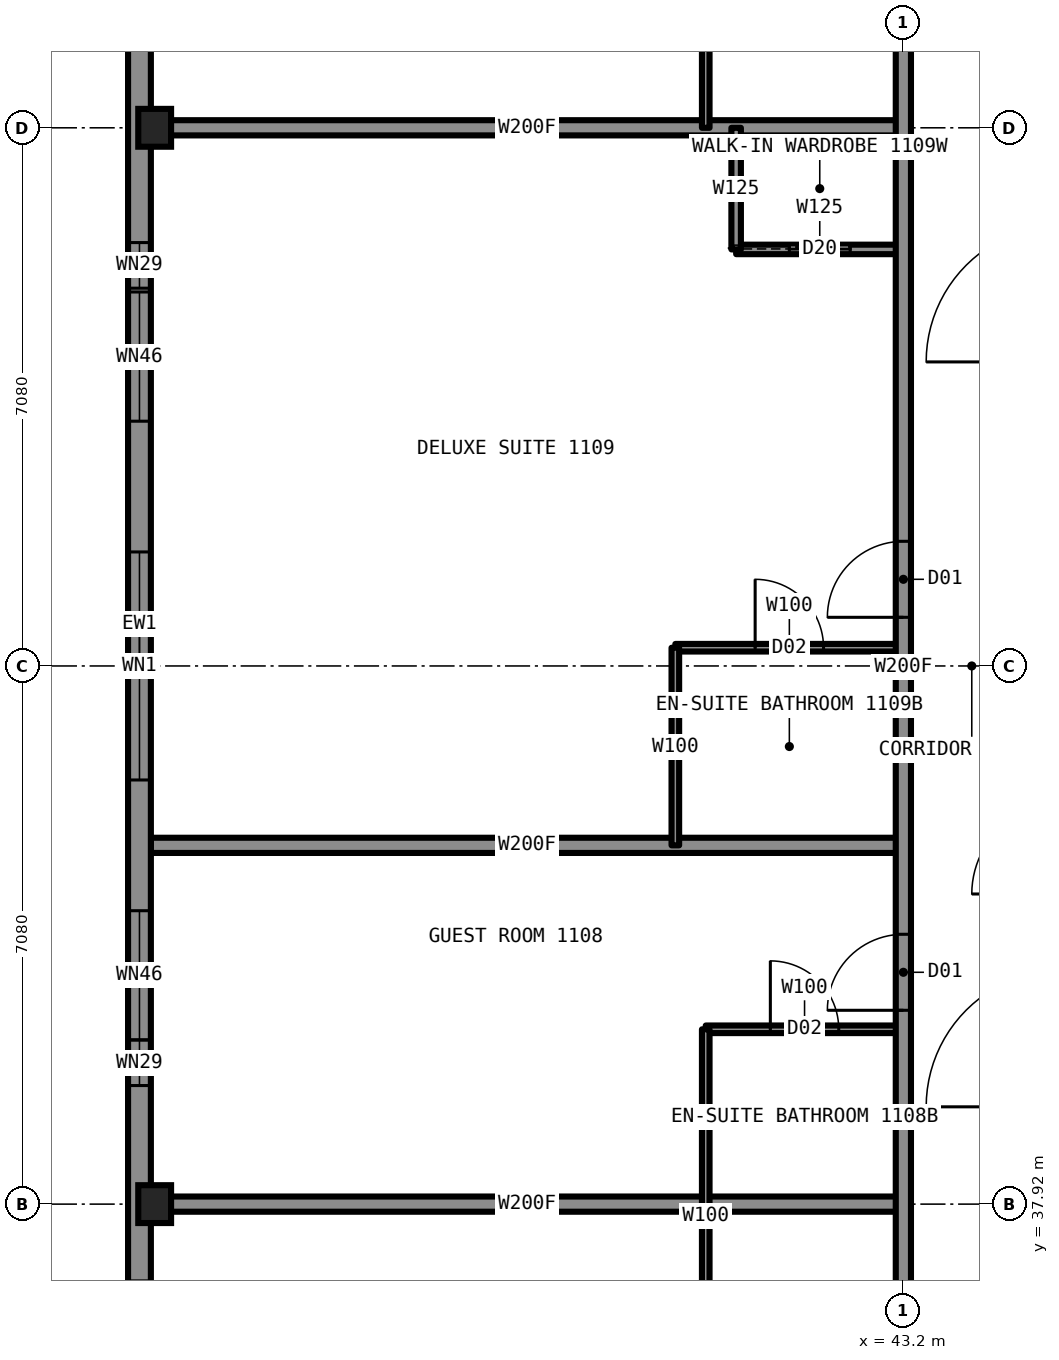
"""IFC4 building model, lengths in metres.
Left out: names, types, materials, properties, quantities, classifications, styles, units other than length and angle.
Written with IfcOpenShell. Run it as: python <this file> out.ifc"""

import sys

from ifc_helpers import new_model, si_unit, direction, frame, frame_2d, origin, origin_2d, place, context, subcontext, project, spatial, rectangle, i_section, extrude, element, fill, save


model = new_model("IFC4")
c1 = context("Model", 3, precision=1e-05, world=origin(), true_north=direction((0.0, 1.0)))
c2 = subcontext(c1, "Body", "Model", "MODEL_VIEW")
j1 = project(units=[si_unit("LENGTHUNIT", "METRE"), si_unit("PLANEANGLEUNIT", "RADIAN")], contexts=[c1])
p1 = place(None, origin())
s1 = spatial("IfcSite", under=j1, at=p1, CompositionType="ELEMENT")
p2 = place(p1, origin())
s2 = spatial("IfcBuilding", under=s1, at=p2, CompositionType="ELEMENT")
p3 = place(p2, frame((0.0, 0.0, 39.0)))
s3 = spatial("IfcBuildingStorey", under=s2, at=p3, CompositionType="ELEMENT", Elevation=39.0)
for number, where, z_axis, x_axis in (
    (1, (33.35, 37.92, 0.0), (0.0, 0.0, 1.0), (1.0, 0.0, 0.0)),
    (2, (33.35, 52.08, 0.0), (0.0, 0.0, 1.0), (1.0, 0.0, 0.0)),
):
    element("IfcColumn", number, at=place(p3, frame(where, z_axis=z_axis, x_axis=x_axis)), inside=s3, PredefinedType="COLUMN", context=c2, shape_type="SweptSolid", body=[
        extrude(i_section(OverallWidth=0.432, OverallDepth=0.498, WebThickness=0.056, FlangeThickness=0.089, at=origin_2d()), origin(), (0.0, 0.0, 1.0), 3.5),
    ])
p4 = place(p3, frame((33.3, 42.64, 0.0), z_axis=(0.0, 0.0, 1.0), x_axis=(1.0, 0.0, 0.0)))
e3 = element("IfcWall", 3, at=p4, inside=s3, PredefinedType="PARTITIONING", context=c2, shape_type="SweptSolid", body=[
    extrude(rectangle(XDim=9.9, YDim=0.2, at=frame_2d((4.95, 0.0))), origin(), (0.0, 0.0, 1.0), 2.723),
])
p5 = place(p3, frame((40.6, 40.22, 0.0), z_axis=(0.0, 0.0, 1.0), x_axis=(1.0, 0.0, 0.0)))
e4 = element("IfcWall", 4, at=p5, inside=s3, PredefinedType="PARTITIONING", context=c2, shape_type="SweptSolid", body=[
    extrude(rectangle(XDim=2.6, YDim=0.1, at=frame_2d((1.3, 0.0))), origin(), (0.0, 0.0, 1.0), 2.723),
])
p6 = place(p5, frame((0.85, 0.0, 0.0)))
e5 = element("IfcOpeningElement", 5, at=p6, cuts=e4, PredefinedType="OPENING", context=c2, shape_type="SweptSolid", body=[
    extrude(rectangle(XDim=0.9, YDim=2.1, at=frame_2d((0.45, 1.05))), frame((0.0, 0.06, 0.0), z_axis=(0.0, -1.0, 0.0), x_axis=(1.0, 0.0, 0.0)), (0.0, 0.0, 1.0), 0.12),
])
p7 = place(p3, frame((33.3, 37.92, 0.0), z_axis=(0.0, 0.0, 1.0), x_axis=(1.0, 0.0, 0.0)))
e6 = element("IfcWall", 6, at=p7, inside=s3, PredefinedType="PARTITIONING", context=c2, shape_type="SweptSolid", body=[
    extrude(rectangle(XDim=9.9, YDim=0.2, at=frame_2d((4.95, 0.0))), origin(), (0.0, 0.0, 1.0), 2.573),
])
p8 = place(p3, frame((40.2, 45.24, 0.0), z_axis=(0.0, 0.0, 1.0), x_axis=(1.0, 0.0, 0.0)))
e7 = element("IfcWall", 7, at=p8, inside=s3, PredefinedType="PARTITIONING", context=c2, shape_type="SweptSolid", body=[
    extrude(rectangle(XDim=3.0, YDim=0.1, at=frame_2d((1.5, 0.0))), origin(), (0.0, 0.0, 1.0), 3.33),
])
p9 = place(p8, frame((1.05, 0.0, 0.0)))
e8 = element("IfcOpeningElement", 8, at=p9, cuts=e7, PredefinedType="OPENING", context=c2, shape_type="SweptSolid", body=[
    extrude(rectangle(XDim=0.9, YDim=2.1, at=frame_2d((0.45, 1.05))), frame((0.0, 0.06, 0.0), z_axis=(0.0, -1.0, 0.0), x_axis=(1.0, 0.0, 0.0)), (0.0, 0.0, 1.0), 0.12),
])
p10 = place(p3, frame((41.0, 50.48, 0.0), z_axis=(0.0, 0.0, 1.0), x_axis=(1.0, 0.0, 0.0)))
e9 = element("IfcWall", 9, at=p10, inside=s3, PredefinedType="PARTITIONING", context=c2, shape_type="SweptSolid", body=[
    extrude(rectangle(XDim=2.2, YDim=0.125, at=frame_2d((1.1, 0.0))), origin(), (0.0, 0.0, 1.0), 3.33),
])
p11 = place(p10, frame((0.7, 0.0, 0.0)))
e10 = element("IfcOpeningElement", 10, at=p11, cuts=e9, PredefinedType="OPENING", context=c2, shape_type="SweptSolid", body=[
    extrude(rectangle(XDim=0.8, YDim=2.1, at=frame_2d((0.4, 1.05))), frame((0.0, 0.073, 0.0), z_axis=(0.0, -1.0, 0.0), x_axis=(1.0, 0.0, 0.0)), (0.0, 0.0, 1.0), 0.145),
])
p12 = place(p3, frame((33.3, 52.08, 0.0), z_axis=(0.0, 0.0, 1.0), x_axis=(1.0, 0.0, 0.0)))
e11 = element("IfcWall", 11, at=p12, inside=s3, PredefinedType="PARTITIONING", context=c2, shape_type="SweptSolid", body=[
    extrude(rectangle(XDim=9.9, YDim=0.2, at=frame_2d((4.95, 0.0))), origin(), (0.0, 0.0, 1.0), 2.573),
])
p13 = place(p3, frame((43.2, 33.2, 0.0), z_axis=(0.0, 0.0, 1.0), x_axis=(0.0, 1.0, 0.0)))
e12 = element("IfcWall", 12, at=p13, inside=s3, PredefinedType="PARTITIONING", context=c2, shape_type="SweptSolid", body=[
    extrude(rectangle(XDim=23.58, YDim=0.2, at=frame_2d((11.79, 0.0))), origin(), (0.0, 0.0, 1.0), 3.33),
])
p14 = place(p13, frame((7.27, 0.0, 0.0)))
e13 = element("IfcOpeningElement", 13, at=p14, cuts=e12, PredefinedType="OPENING", context=c2, shape_type="SweptSolid", body=[
    extrude(rectangle(XDim=1.0, YDim=2.2, at=frame_2d((0.5, 1.1))), frame((0.0, 0.11, 0.0), z_axis=(0.0, -1.0, 0.0), x_axis=(1.0, 0.0, 0.0)), (0.0, 0.0, 1.0), 0.22),
])
p15 = place(p13, frame((12.44, 0.0, 0.0)))
e14 = element("IfcOpeningElement", 14, at=p15, cuts=e12, PredefinedType="OPENING", context=c2, shape_type="SweptSolid", body=[
    extrude(rectangle(XDim=1.0, YDim=2.2, at=frame_2d((0.5, 1.1))), frame((0.0, 0.11, 0.0), z_axis=(0.0, -1.0, 0.0), x_axis=(1.0, 0.0, 0.0)), (0.0, 0.0, 1.0), 0.22),
])
p16 = place(p13, frame((21.84, 0.0, 0.0)))
e15 = element("IfcOpeningElement", 15, at=p16, cuts=e12, PredefinedType="OPENING", context=c2, shape_type="SweptSolid", body=[
    extrude(rectangle(XDim=1.1, YDim=2.2, at=frame_2d((0.55, 1.1))), frame((0.0, 0.11, 0.0), z_axis=(0.0, -1.0, 0.0), x_axis=(1.0, 0.0, 0.0)), (0.0, 0.0, 1.0), 0.22),
])
p17 = place(p13, frame((0.66, 0.0, 0.0)))
e16 = element("IfcOpeningElement", 16, at=p17, cuts=e12, PredefinedType="OPENING", context=c2, shape_type="SweptSolid", body=[
    extrude(rectangle(XDim=1.1, YDim=2.2, at=frame_2d((0.55, 1.1))), frame((0.0, 0.11, 0.0), z_axis=(0.0, -1.0, 0.0), x_axis=(1.0, 0.0, 0.0)), (0.0, 0.0, 1.0), 0.22),
])
p18 = place(p3, frame((41.0, 50.48, 0.0), z_axis=(0.0, 0.0, 1.0), x_axis=(0.0, 1.0, 0.0)))
e17 = element("IfcWall", 17, at=p18, inside=s3, PredefinedType="PARTITIONING", context=c2, shape_type="SweptSolid", body=[
    extrude(rectangle(XDim=1.6, YDim=0.125, at=frame_2d((0.8, 0.0))), origin(), (0.0, 0.0, 1.0), 3.33),
])
p19 = place(p3, frame((40.6, 35.32, 0.0), z_axis=(0.0, 0.0, 1.0), x_axis=(0.0, 1.0, 0.0)))
e18 = element("IfcWall", 18, at=p19, inside=s3, PredefinedType="PARTITIONING", context=c2, shape_type="SweptSolid", body=[
    extrude(rectangle(XDim=4.9, YDim=0.1, at=frame_2d((2.45, 0.0))), origin(), (0.0, 0.0, 1.0), 3.33),
])
p20 = place(p3, frame((40.6, 52.08, 0.0), z_axis=(0.0, 0.0, 1.0), x_axis=(0.0, 1.0, 0.0)))
e19 = element("IfcWall", 19, at=p20, inside=s3, PredefinedType="PARTITIONING", context=c2, shape_type="SweptSolid", body=[
    extrude(rectangle(XDim=2.6, YDim=0.1, at=frame_2d((1.3, 0.0))), origin(), (0.0, 0.0, 1.0), 3.33),
])
p21 = place(p3, frame((40.2, 42.64, 0.0), z_axis=(0.0, 0.0, 1.0), x_axis=(0.0, 1.0, 0.0)))
e20 = element("IfcWall", 20, at=p21, inside=s3, PredefinedType="PARTITIONING", context=c2, shape_type="SweptSolid", body=[
    extrude(rectangle(XDim=2.6, YDim=0.1, at=frame_2d((1.3, 0.0))), origin(), (0.0, 0.0, 1.0), 3.33),
])
p22 = place(p3, frame((33.15, 61.5, 0.0), z_axis=(0.0, 0.0, 1.0), x_axis=(0.0, -1.0, 0.0)))
e21 = element("IfcWall", 21, at=p22, inside=s3, PredefinedType="SOLIDWALL", context=c2, shape_type="SweptSolid", body=[
    extrude(rectangle(XDim=33.0, YDim=0.3, at=frame_2d((16.5, 0.0))), origin(), (0.0, 0.0, 1.0), 2.83),
])
p23 = place(p22, frame((0.85, 0.0, 0.5)))
e22 = element("IfcOpeningElement", 22, at=p23, cuts=e21, PredefinedType="OPENING", context=c2, shape_type="SweptSolid", body=[
    extrude(rectangle(XDim=2.5, YDim=2.0, at=frame_2d((1.25, 1.0))), frame((0.0, 0.16, 0.0), z_axis=(0.0, -1.0, 0.0), x_axis=(1.0, 0.0, 0.0)), (0.0, 0.0, 1.0), 0.32),
])
p24 = place(p22, frame((6.61, 0.0, 0.5)))
e23 = element("IfcOpeningElement", 23, at=p24, cuts=e21, PredefinedType="OPENING", context=c2, shape_type="SweptSolid", body=[
    extrude(rectangle(XDim=1.9, YDim=1.9, at=frame_2d((0.95, 0.95))), frame((0.0, 0.16, 0.0), z_axis=(0.0, -1.0, 0.0), x_axis=(1.0, 0.0, 0.0)), (0.0, 0.0, 1.0), 0.32),
])
p25 = place(p22, frame((10.28, 0.0, 0.5)))
e24 = element("IfcOpeningElement", 24, at=p25, cuts=e21, PredefinedType="OPENING", context=c2, shape_type="SweptSolid", body=[
    extrude(rectangle(XDim=3.0, YDim=2.0, at=frame_2d((1.5, 1.0))), frame((0.0, 0.16, 0.0), z_axis=(0.0, -1.0, 0.0), x_axis=(1.0, 0.0, 0.0)), (0.0, 0.0, 1.0), 0.32),
])
p26 = place(p22, frame((15.0, 0.0, 0.5)))
e25 = element("IfcOpeningElement", 25, at=p26, cuts=e21, PredefinedType="OPENING", context=c2, shape_type="SweptSolid", body=[
    extrude(rectangle(XDim=3.0, YDim=2.0, at=frame_2d((1.5, 1.0))), frame((0.0, 0.16, 0.0), z_axis=(0.0, -1.0, 0.0), x_axis=(1.0, 0.0, 0.0)), (0.0, 0.0, 1.0), 0.32),
])
p27 = place(p22, frame((19.72, 0.0, 0.5)))
e26 = element("IfcOpeningElement", 26, at=p27, cuts=e21, PredefinedType="OPENING", context=c2, shape_type="SweptSolid", body=[
    extrude(rectangle(XDim=3.0, YDim=2.0, at=frame_2d((1.5, 1.0))), frame((0.0, 0.16, 0.0), z_axis=(0.0, -1.0, 0.0), x_axis=(1.0, 0.0, 0.0)), (0.0, 0.0, 1.0), 0.32),
])
p28 = place(p22, frame((24.44, 0.0, 0.5)))
e27 = element("IfcOpeningElement", 27, at=p28, cuts=e21, PredefinedType="OPENING", context=c2, shape_type="SweptSolid", body=[
    extrude(rectangle(XDim=1.9, YDim=1.9, at=frame_2d((0.95, 0.95))), frame((0.0, 0.16, 0.0), z_axis=(0.0, -1.0, 0.0), x_axis=(1.0, 0.0, 0.0)), (0.0, 0.0, 1.0), 0.32),
])
p29 = place(p22, frame((29.6, 0.0, 0.5)))
e28 = element("IfcOpeningElement", 28, at=p29, cuts=e21, PredefinedType="OPENING", context=c2, shape_type="SweptSolid", body=[
    extrude(rectangle(XDim=2.5, YDim=2.0, at=frame_2d((1.25, 1.0))), frame((0.0, 0.16, 0.0), z_axis=(0.0, -1.0, 0.0), x_axis=(1.0, 0.0, 0.0)), (0.0, 0.0, 1.0), 0.32),
])
p30 = place(p22, frame((5.91, 0.0, 0.5)))
e29 = element("IfcOpeningElement", 29, at=p30, cuts=e21, PredefinedType="OPENING", context=c2, shape_type="SweptSolid", body=[
    extrude(rectangle(XDim=0.7, YDim=1.0, at=frame_2d((0.35, 0.5))), frame((0.0, 0.16, 0.0), z_axis=(0.0, -1.0, 0.0), x_axis=(1.0, 0.0, 0.0)), (0.0, 0.0, 1.0), 0.32),
])
p31 = place(p22, frame((26.39, 0.0, 0.5)))
e30 = element("IfcOpeningElement", 30, at=p31, cuts=e21, PredefinedType="OPENING", context=c2, shape_type="SweptSolid", body=[
    extrude(rectangle(XDim=0.7, YDim=1.0, at=frame_2d((0.35, 0.5))), frame((0.0, 0.16, 0.0), z_axis=(0.0, -1.0, 0.0), x_axis=(1.0, 0.0, 0.0)), (0.0, 0.0, 1.0), 0.32),
])
p32 = place(p14, origin())
e31 = element("IfcDoor", 31, at=p32, inside=s3, OperationType="SINGLE_SWING_LEFT", PredefinedType="DOOR", context=c2, shape_type="SweptSolid", body=[
    extrude(rectangle(XDim=1.0, YDim=2.2, at=frame_2d((0.5, 1.1))), frame((0.0, 0.025, 0.0), z_axis=(0.0, -1.0, 0.0), x_axis=(1.0, 0.0, 0.0)), (0.0, 0.0, 1.0), 0.05),
])
fill(e13, e31)
p33 = place(p6, origin())
e32 = element("IfcDoor", 32, at=p33, inside=s3, OperationType="SINGLE_SWING_RIGHT", PredefinedType="DOOR", context=c2, shape_type="SweptSolid", body=[
    extrude(rectangle(XDim=0.9, YDim=2.1, at=frame_2d((0.45, 1.05))), frame((0.0, 0.025, 0.0), z_axis=(0.0, -1.0, 0.0), x_axis=(1.0, 0.0, 0.0)), (0.0, 0.0, 1.0), 0.05),
])
fill(e5, e32)
p34 = place(p15, origin())
e33 = element("IfcDoor", 33, at=p34, inside=s3, OperationType="SINGLE_SWING_LEFT", PredefinedType="DOOR", context=c2, shape_type="SweptSolid", body=[
    extrude(rectangle(XDim=1.0, YDim=2.2, at=frame_2d((0.5, 1.1))), frame((0.0, 0.025, 0.0), z_axis=(0.0, -1.0, 0.0), x_axis=(1.0, 0.0, 0.0)), (0.0, 0.0, 1.0), 0.05),
])
fill(e14, e33)
p35 = place(p9, origin())
e34 = element("IfcDoor", 34, at=p35, inside=s3, OperationType="SINGLE_SWING_RIGHT", PredefinedType="DOOR", context=c2, shape_type="SweptSolid", body=[
    extrude(rectangle(XDim=0.9, YDim=2.1, at=frame_2d((0.45, 1.05))), frame((0.0, 0.025, 0.0), z_axis=(0.0, -1.0, 0.0), x_axis=(1.0, 0.0, 0.0)), (0.0, 0.0, 1.0), 0.05),
])
fill(e8, e34)
p36 = place(p11, origin())
e35 = element("IfcDoor", 35, at=p36, inside=s3, OperationType="SLIDING_TO_LEFT", PredefinedType="DOOR", context=c2, shape_type="SweptSolid", body=[
    extrude(rectangle(XDim=0.8, YDim=2.1, at=frame_2d((0.4, 1.05))), frame((0.0, 0.025, 0.0), z_axis=(0.0, -1.0, 0.0), x_axis=(1.0, 0.0, 0.0)), (0.0, 0.0, 1.0), 0.05),
])
fill(e10, e35)
p37 = place(p24, origin())
e36 = element("IfcWindow", 36, at=p37, inside=s3, PartitioningType="SINGLE_PANEL", PredefinedType="WINDOW", context=c2, shape_type="SweptSolid", body=[
    extrude(rectangle(XDim=1.9, YDim=1.9, at=frame_2d((0.95, 0.95))), frame((0.0, 0.03, 0.0), z_axis=(0.0, -1.0, 0.0), x_axis=(1.0, 0.0, 0.0)), (0.0, 0.0, 1.0), 0.06),
])
fill(e23, e36)
p38 = place(p25, origin())
e37 = element("IfcWindow", 37, at=p38, inside=s3, PartitioningType="SINGLE_PANEL", PredefinedType="WINDOW", context=c2, shape_type="SweptSolid", body=[
    extrude(rectangle(XDim=3.0, YDim=2.0, at=frame_2d((1.5, 1.0))), frame((0.0, 0.03, 0.0), z_axis=(0.0, -1.0, 0.0), x_axis=(1.0, 0.0, 0.0)), (0.0, 0.0, 1.0), 0.06),
])
fill(e24, e37)
p39 = place(p26, origin())
e38 = element("IfcWindow", 38, at=p39, inside=s3, PartitioningType="SINGLE_PANEL", PredefinedType="WINDOW", context=c2, shape_type="SweptSolid", body=[
    extrude(rectangle(XDim=3.0, YDim=2.0, at=frame_2d((1.5, 1.0))), frame((0.0, 0.03, 0.0), z_axis=(0.0, -1.0, 0.0), x_axis=(1.0, 0.0, 0.0)), (0.0, 0.0, 1.0), 0.06),
])
fill(e25, e38)
p40 = place(p27, origin())
e39 = element("IfcWindow", 39, at=p40, inside=s3, PartitioningType="SINGLE_PANEL", PredefinedType="WINDOW", context=c2, shape_type="SweptSolid", body=[
    extrude(rectangle(XDim=3.0, YDim=2.0, at=frame_2d((1.5, 1.0))), frame((0.0, 0.03, 0.0), z_axis=(0.0, -1.0, 0.0), x_axis=(1.0, 0.0, 0.0)), (0.0, 0.0, 1.0), 0.06),
])
fill(e26, e39)
p41 = place(p28, origin())
e40 = element("IfcWindow", 40, at=p41, inside=s3, PartitioningType="SINGLE_PANEL", PredefinedType="WINDOW", context=c2, shape_type="SweptSolid", body=[
    extrude(rectangle(XDim=1.9, YDim=1.9, at=frame_2d((0.95, 0.95))), frame((0.0, 0.03, 0.0), z_axis=(0.0, -1.0, 0.0), x_axis=(1.0, 0.0, 0.0)), (0.0, 0.0, 1.0), 0.06),
])
fill(e27, e40)
save(model, sys.argv[1])
